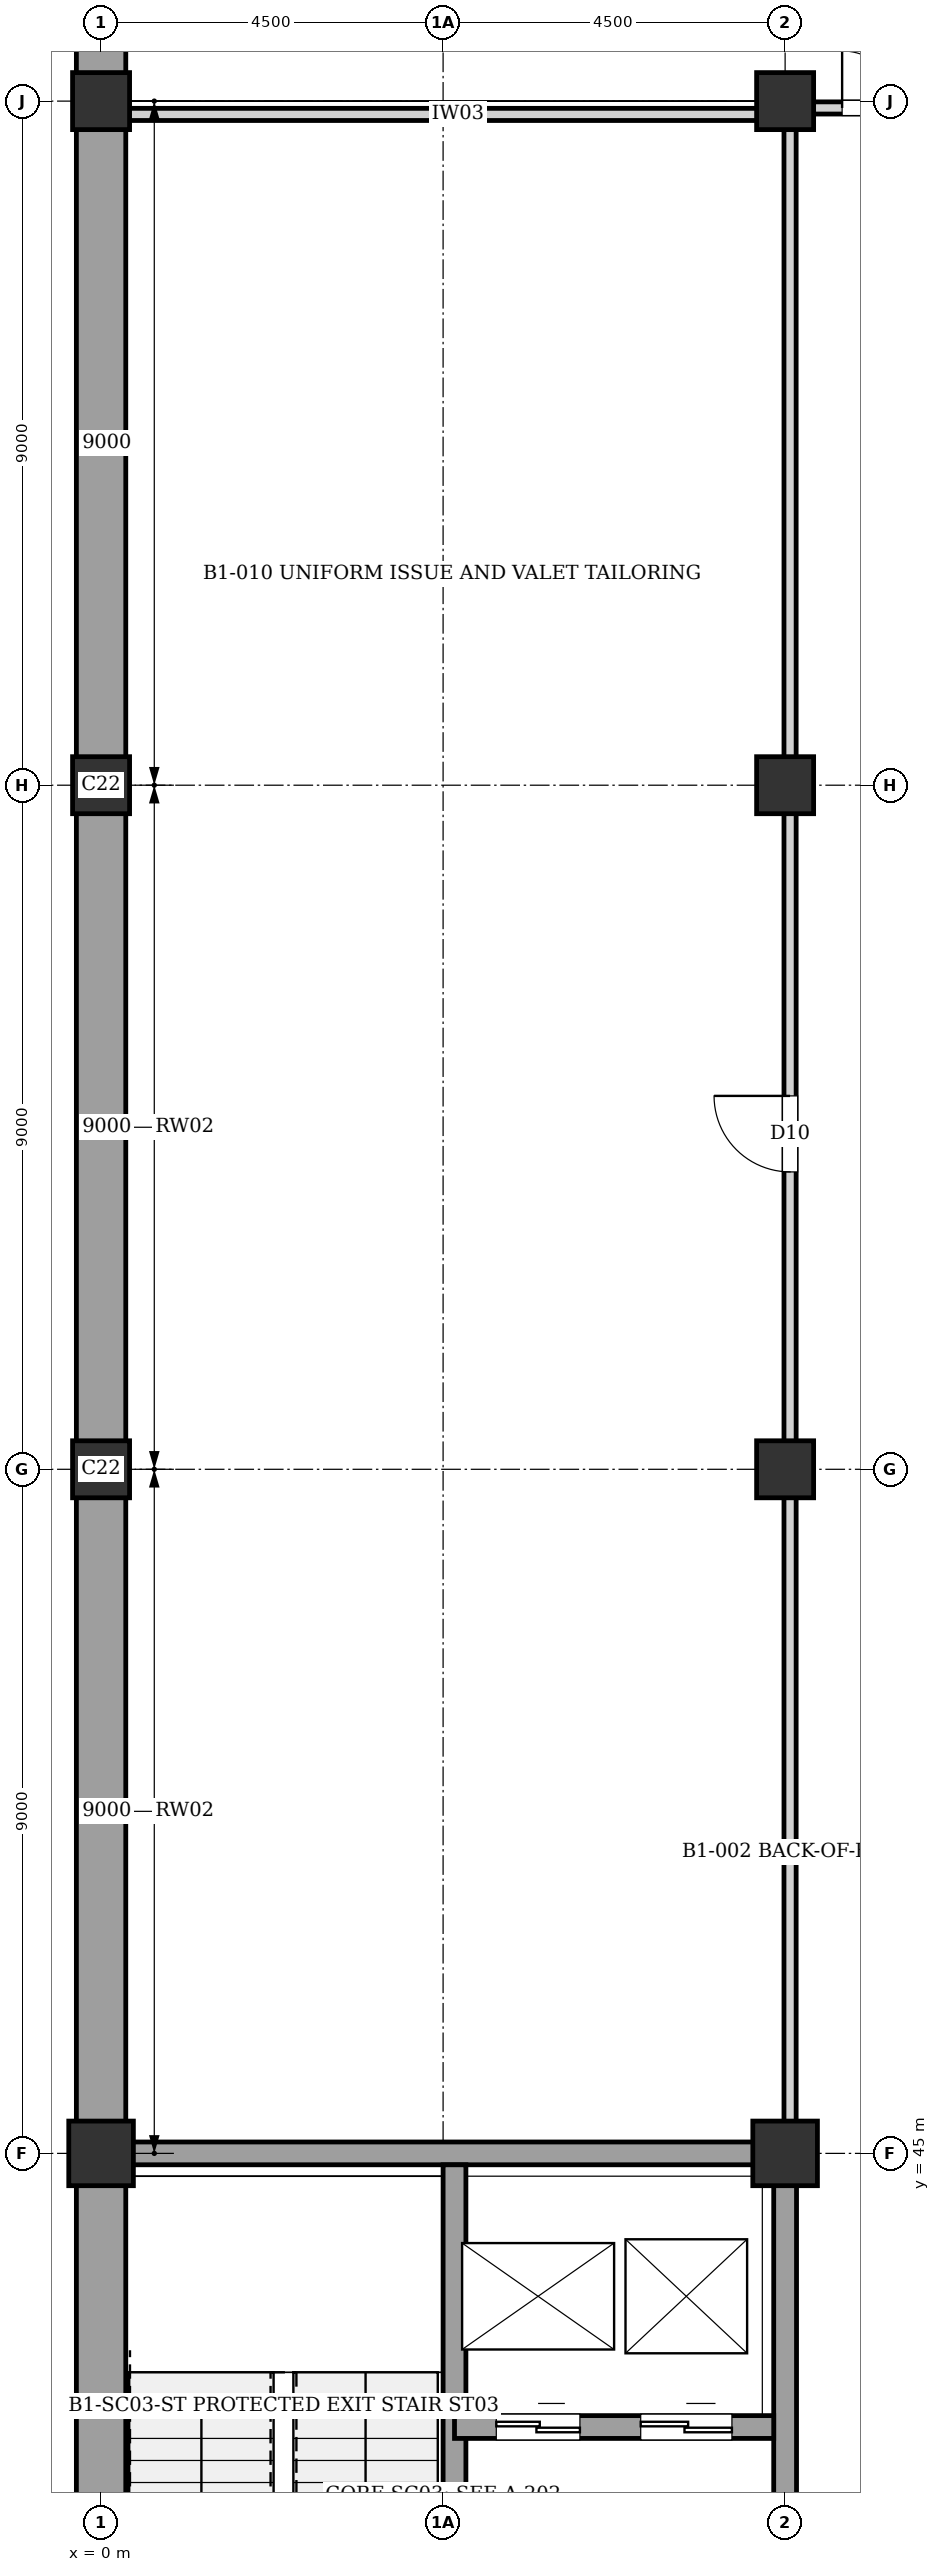
"""IFC4 building model, lengths in metres.
Left out: names, types, materials, properties, quantities, classifications, styles, units other than length and angle.
Written with IfcOpenShell. Run it as: python <this file> out.ifc"""

import sys

from ifc_helpers import new_model, si_unit, direction, frame, frame_2d, origin, origin_2d, place, context, subcontext, project, spatial, rectangle, extrude, element, fill, save


model = new_model("IFC4")
c1 = context("Model", 3, precision=1e-05, world=origin(), true_north=direction((0.0, 1.0)))
c2 = subcontext(c1, "Body", "Model", "MODEL_VIEW")
j1 = project(units=[si_unit("LENGTHUNIT", "METRE"), si_unit("PLANEANGLEUNIT", "RADIAN")], contexts=[c1])
p1 = place(None, origin())
s1 = spatial("IfcSite", under=j1, at=p1, CompositionType="ELEMENT")
p2 = place(p1, origin())
s2 = spatial("IfcBuilding", under=s1, at=p2, CompositionType="ELEMENT")
p3 = place(p2, frame((0.0, 0.0, -4.48)))
s3 = spatial("IfcBuildingStorey", under=s2, at=p3, CompositionType="ELEMENT", Elevation=-4.48)
p4 = place(p3, frame((0.0, 45.0, 0.0), z_axis=(0.0, 0.0, 1.0), x_axis=(1.0, 0.0, 0.0)))
e1 = element("IfcColumn", 1, at=p4, inside=s3, PredefinedType="COLUMN", context=c2, shape_type="SweptSolid", body=[
    extrude(rectangle(XDim=0.85, YDim=0.85, at=origin_2d()), origin(), (0.0, 0.0, 1.0), 4.48),
])
for number, where, z_axis, x_axis in (
    (2, (0.0, 54.0, 0.0), (0.0, 0.0, 1.0), (1.0, 0.0, 0.0)),
    (3, (0.0, 63.0, 0.0), (0.0, 0.0, 1.0), (1.0, 0.0, 0.0)),
    (4, (0.0, 72.0, 0.0), (0.0, 0.0, 1.0), (1.0, 0.0, 0.0)),
):
    element("IfcColumn", number, at=place(p3, frame(where, z_axis=z_axis, x_axis=x_axis)), inside=s3, PredefinedType="COLUMN", context=c2, shape_type="SweptSolid", body=[
        extrude(rectangle(XDim=0.75, YDim=0.75, at=origin_2d()), origin(), (0.0, 0.0, 1.0), 4.48),
    ])
p5 = place(p3, frame((9.0, 45.0, 0.0), z_axis=(0.0, 0.0, 1.0), x_axis=(1.0, 0.0, 0.0)))
e5 = element("IfcColumn", 5, at=p5, inside=s3, PredefinedType="COLUMN", context=c2, shape_type="SweptSolid", body=[
    extrude(rectangle(XDim=0.85, YDim=0.85, at=origin_2d()), origin(), (0.0, 0.0, 1.0), 4.48),
])
for number, where, z_axis, x_axis in (
    (6, (9.0, 54.0, 0.0), (0.0, 0.0, 1.0), (1.0, 0.0, 0.0)),
    (7, (9.0, 63.0, 0.0), (0.0, 0.0, 1.0), (1.0, 0.0, 0.0)),
    (8, (9.0, 72.0, 0.0), (0.0, 0.0, 1.0), (1.0, 0.0, 0.0)),
):
    element("IfcColumn", number, at=place(p3, frame(where, z_axis=z_axis, x_axis=x_axis)), inside=s3, PredefinedType="COLUMN", context=c2, shape_type="SweptSolid", body=[
        extrude(rectangle(XDim=0.75, YDim=0.75, at=origin_2d()), origin(), (0.0, 0.0, 1.0), 4.48),
    ])
for number, where, z_axis, x_axis in (
    (9, (0.0, 36.0, 0.0), (0.0, 0.0, 1.0), (0.0, 1.0, 0.0)),
    (10, (0.0, 45.0, 0.0), (0.0, 0.0, 1.0), (0.0, 1.0, 0.0)),
    (11, (0.0, 54.0, 0.0), (0.0, 0.0, 1.0), (0.0, 1.0, 0.0)),
    (12, (0.0, 63.0, 0.0), (0.0, 0.0, 1.0), (0.0, 1.0, 0.0)),
):
    element("IfcWall", number, at=place(p3, frame(where, z_axis=z_axis, x_axis=x_axis)), inside=s3, PredefinedType="USERDEFINED", context=c2, shape_type="SweptSolid", body=[
        extrude(rectangle(XDim=9.0, YDim=0.65, at=frame_2d((4.5, 0.0))), origin(), (0.0, 0.0, 1.0), 4.22),
    ])
p6 = place(p3, frame((0.0, 72.0, 0.0), z_axis=(0.0, 0.0, 1.0), x_axis=(0.0, 1.0, 0.0)))
e13 = element("IfcWall", 13, at=p6, inside=s3, PredefinedType="USERDEFINED", context=c2, shape_type="SweptSolid", body=[
    extrude(rectangle(XDim=9.0, YDim=0.65, at=frame_2d((4.5, 0.0))), origin(), (0.0, 0.0, 1.0), 4.03),
])
p7 = place(p3, frame((9.0, 36.0, 0.0), z_axis=(0.0, 0.0, 1.0), x_axis=(0.0, 1.0, 0.0)))
e14 = element("IfcWall", 14, at=p7, inside=s3, PredefinedType="SHEAR", context=c2, shape_type="SweptSolid", body=[
    extrude(rectangle(XDim=9.0, YDim=0.3, at=frame_2d((4.5, 0.0))), origin(), (0.0, 0.0, 1.0), 4.22),
])
p8 = place(p7, frame((1.95, 0.0, 0.0)))
e15 = element("IfcOpeningElement", 15, at=p8, cuts=e14, PredefinedType="OPENING", context=c2, shape_type="SweptSolid", body=[
    extrude(rectangle(XDim=1.6, YDim=2.1, at=frame_2d((0.8, 1.05))), frame((0.0, 0.16, 0.0), z_axis=(0.0, -1.0, 0.0), x_axis=(1.0, 0.0, 0.0)), (0.0, 0.0, 1.0), 0.32),
])
p9 = place(p3, frame((0.0, 45.0, 0.0), z_axis=(0.0, 0.0, 1.0), x_axis=(1.0, 0.0, 0.0)))
e16 = element("IfcWall", 16, at=p9, inside=s3, PredefinedType="SHEAR", context=c2, shape_type="SweptSolid", body=[
    extrude(rectangle(XDim=9.0, YDim=0.3, at=frame_2d((4.5, 0.0))), origin(), (0.0, 0.0, 1.0), 4.22),
])
p10 = place(p3, frame((4.65, 36.15, 0.0), z_axis=(0.0, 0.0, 1.0), x_axis=(0.0, 1.0, 0.0)))
e17 = element("IfcWall", 17, at=p10, inside=s3, PredefinedType="SHEAR", context=c2, shape_type="SweptSolid", body=[
    extrude(rectangle(XDim=8.7, YDim=0.3, at=frame_2d((4.35, 0.0))), origin(), (0.0, 0.0, 1.0), 4.22),
])
p11 = place(p10, frame((0.35, 0.0, 0.0)))
e18 = element("IfcOpeningElement", 18, at=p11, cuts=e17, PredefinedType="OPENING", context=c2, shape_type="SweptSolid", body=[
    extrude(rectangle(XDim=1.4, YDim=2.02, at=frame_2d((0.7, 1.01))), frame((0.0, 0.16, 0.0), z_axis=(0.0, -1.0, 0.0), x_axis=(1.0, 0.0, 0.0)), (0.0, 0.0, 1.0), 0.32),
])
p12 = place(p3, frame((4.65, 41.4, 0.0), z_axis=(0.0, 0.0, 1.0), x_axis=(1.0, 0.0, 0.0)))
e19 = element("IfcWall", 19, at=p12, inside=s3, PredefinedType="SHEAR", context=c2, shape_type="SweptSolid", body=[
    extrude(rectangle(XDim=4.2, YDim=0.3, at=frame_2d((2.1, 0.0))), origin(), (0.0, 0.0, 1.0), 4.22),
])
p13 = place(p12, frame((0.55, 0.0, 0.0)))
e20 = element("IfcOpeningElement", 20, at=p13, cuts=e19, PredefinedType="OPENING", context=c2, shape_type="SweptSolid", body=[
    extrude(rectangle(XDim=1.1, YDim=2.1, at=frame_2d((0.55, 1.05))), frame((0.0, 0.16, 0.0), z_axis=(0.0, -1.0, 0.0), x_axis=(1.0, 0.0, 0.0)), (0.0, 0.0, 1.0), 0.32),
])
p14 = place(p12, frame((2.45, 0.0, 0.0)))
e21 = element("IfcOpeningElement", 21, at=p14, cuts=e19, PredefinedType="OPENING", context=c2, shape_type="SweptSolid", body=[
    extrude(rectangle(XDim=1.2, YDim=2.2, at=frame_2d((0.6, 1.1))), frame((0.0, 0.16, 0.0), z_axis=(0.0, -1.0, 0.0), x_axis=(1.0, 0.0, 0.0)), (0.0, 0.0, 1.0), 0.32),
])
p15 = place(p3, frame((0.33, 71.825, 0.0), z_axis=(0.0, 0.0, 1.0), x_axis=(1.0, 0.0, 0.0)))
e22 = element("IfcWall", 22, at=p15, inside=s3, PredefinedType="PARTITIONING", context=c2, shape_type="SweptSolid", body=[
    extrude(rectangle(XDim=8.73, YDim=0.16, at=frame_2d((4.365, 0.0))), origin(), (0.0, 0.0, 1.0), 3.32),
])
p16 = place(p3, frame((9.065, 45.155, 0.0), z_axis=(0.0, 0.0, 1.0), x_axis=(0.0, 1.0, 0.0)))
e23 = element("IfcWall", 23, at=p16, inside=s3, PredefinedType="PARTITIONING", context=c2, shape_type="SweptSolid", body=[
    extrude(rectangle(XDim=26.515, YDim=0.16, at=frame_2d((13.257, 0.0))), origin(), (0.0, 0.0, 1.0), 3.32),
])
p17 = place(p16, frame((12.758, 0.0, 0.0)))
e24 = element("IfcOpeningElement", 24, at=p17, cuts=e23, PredefinedType="OPENING", context=c2, shape_type="SweptSolid", body=[
    extrude(rectangle(XDim=1.0, YDim=2.1, at=frame_2d((0.5, 1.05))), frame((0.0, 0.09, 0.0), z_axis=(0.0, -1.0, 0.0), x_axis=(1.0, 0.0, 0.0)), (0.0, 0.0, 1.0), 0.18),
])
p18 = place(p3, frame((9.22, 71.91, 0.0), z_axis=(0.0, 0.0, 1.0), x_axis=(1.0, 0.0, 0.0)))
e25 = element("IfcWall", 25, at=p18, inside=s3, PredefinedType="PARTITIONING", context=c2, shape_type="SweptSolid", body=[
    extrude(rectangle(XDim=2.56, YDim=0.16, at=frame_2d((1.28, 0.0))), origin(), (0.0, 0.0, 1.0), 3.32),
])
p19 = place(p18, frame((0.53, 0.0, 0.0)))
e26 = element("IfcOpeningElement", 26, at=p19, cuts=e25, PredefinedType="OPENING", context=c2, shape_type="SweptSolid", body=[
    extrude(rectangle(XDim=1.5, YDim=2.1, at=frame_2d((0.75, 1.05))), frame((0.0, 0.09, 0.0), z_axis=(0.0, -1.0, 0.0), x_axis=(1.0, 0.0, 0.0)), (0.0, 0.0, 1.0), 0.18),
])
p20 = place(p13, origin())
e27 = element("IfcDoor", 27, at=p20, inside=s3, OperationType="DOUBLE_DOOR_SLIDING", PredefinedType="DOOR", context=c2, shape_type="SweptSolid", body=[
    extrude(rectangle(XDim=1.1, YDim=2.1, at=frame_2d((0.55, 1.05))), frame((0.0, 0.025, 0.0), z_axis=(0.0, -1.0, 0.0), x_axis=(1.0, 0.0, 0.0)), (0.0, 0.0, 1.0), 0.05),
])
fill(e20, e27)
p21 = place(p14, origin())
e28 = element("IfcDoor", 28, at=p21, inside=s3, OperationType="DOUBLE_DOOR_SLIDING", PredefinedType="DOOR", context=c2, shape_type="SweptSolid", body=[
    extrude(rectangle(XDim=1.2, YDim=2.2, at=frame_2d((0.6, 1.1))), frame((0.0, 0.025, 0.0), z_axis=(0.0, -1.0, 0.0), x_axis=(1.0, 0.0, 0.0)), (0.0, 0.0, 1.0), 0.05),
])
fill(e21, e28)
p22 = place(p17, origin())
e29 = element("IfcDoor", 29, at=p22, inside=s3, OperationType="SINGLE_SWING_RIGHT", PredefinedType="DOOR", context=c2, shape_type="SweptSolid", body=[
    extrude(rectangle(XDim=1.0, YDim=2.1, at=frame_2d((0.5, 1.05))), frame((0.0, 0.025, 0.0), z_axis=(0.0, -1.0, 0.0), x_axis=(1.0, 0.0, 0.0)), (0.0, 0.0, 1.0), 0.05),
])
fill(e24, e29)
p23 = place(p19, origin())
e30 = element("IfcDoor", 30, at=p23, inside=s3, OperationType="DOUBLE_DOOR_SINGLE_SWING", PredefinedType="DOOR", context=c2, shape_type="SweptSolid", body=[
    extrude(rectangle(XDim=1.5, YDim=2.1, at=frame_2d((0.75, 1.05))), frame((0.0, 0.025, 0.0), z_axis=(0.0, -1.0, 0.0), x_axis=(1.0, 0.0, 0.0)), (0.0, 0.0, 1.0), 0.05),
])
fill(e26, e30)
save(model, sys.argv[1])
